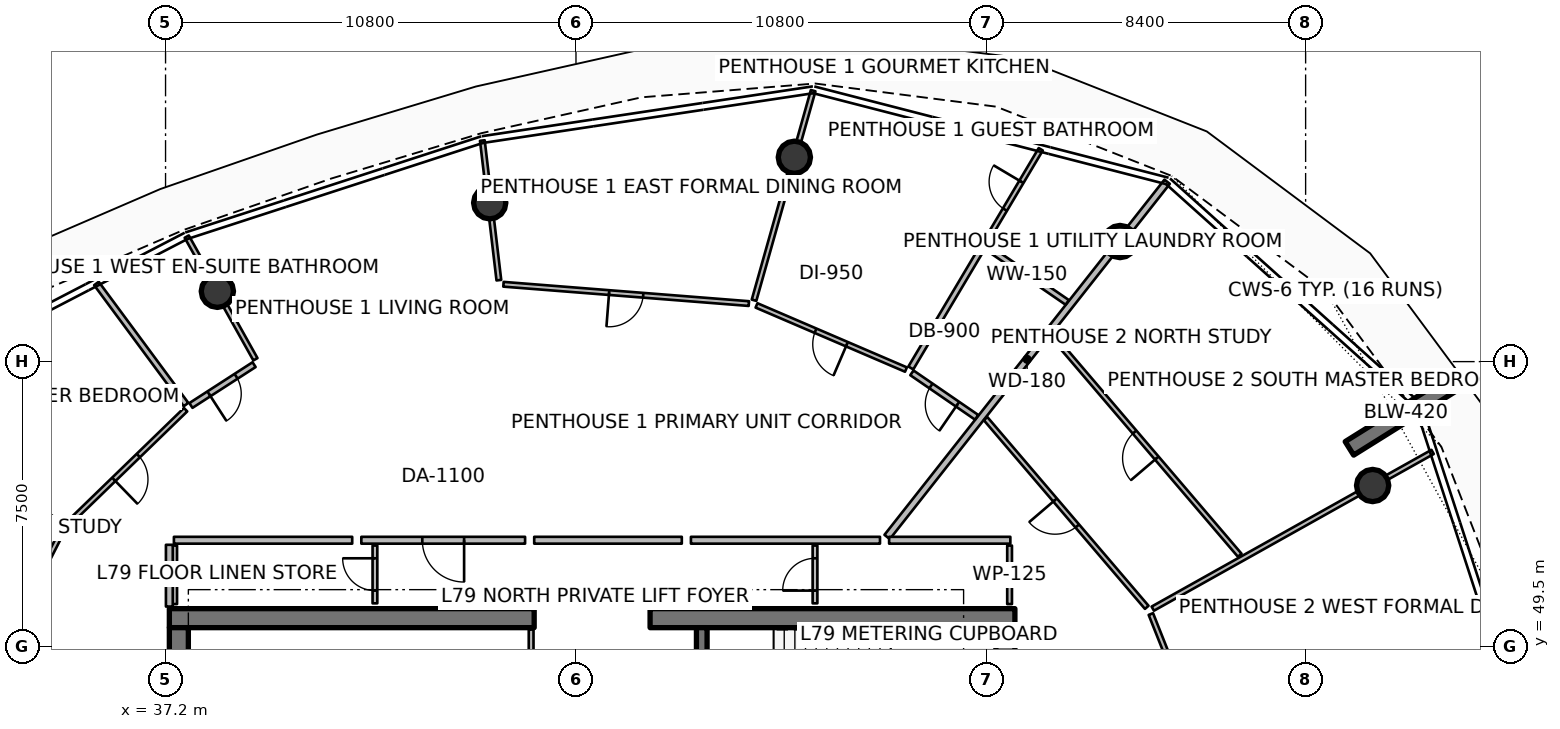
"""IFC4 building model, lengths in metres.
Left out: names, types, materials, properties, quantities, classifications, styles, units other than length and angle.
Written with IfcOpenShell. Run it as: python <this file> out.ifc"""

import sys

from ifc_helpers import new_model, si_unit, direction, frame, frame_2d, origin, origin_2d, place, context, subcontext, project, spatial, rectangle, circle, extrude, element, fill, save


model = new_model("IFC4")
c1 = context("Model", 3, precision=1e-05, world=origin(), true_north=direction((0.0, 1.0)))
c2 = subcontext(c1, "Body", "Model", "MODEL_VIEW")
j1 = project(units=[si_unit("LENGTHUNIT", "METRE"), si_unit("PLANEANGLEUNIT", "RADIAN")], contexts=[c1])
p1 = place(None, origin())
s1 = spatial("IfcSite", under=j1, at=p1, CompositionType="ELEMENT")
p2 = place(p1, origin())
s2 = spatial("IfcBuilding", under=s1, at=p2, CompositionType="ELEMENT")
p3 = place(p2, frame((0.0, 0.0, 313.7)))
s3 = spatial("IfcBuildingStorey", under=s2, at=p3, CompositionType="ELEMENT", Elevation=313.7)
p4 = place(p3, frame((37.3, 50.25, 0.0), z_axis=(0.0, 0.0, 1.0), x_axis=(1.0, 0.0, 0.0)))
e1 = element("IfcWall", 1, at=p4, inside=s3, PredefinedType="SHEAR", context=c2, shape_type="SweptSolid", body=[
    extrude(rectangle(XDim=9.6, YDim=0.5, at=frame_2d((4.8, 0.0))), origin(), (0.0, 0.0, 1.0), 4.2),
])
p5 = place(p3, frame((49.95, 50.25, 0.0), z_axis=(0.0, 0.0, 1.0), x_axis=(1.0, 0.0, 0.0)))
e2 = element("IfcWall", 2, at=p5, inside=s3, PredefinedType="SHEAR", context=c2, shape_type="SweptSolid", body=[
    extrude(rectangle(XDim=9.6, YDim=0.5, at=frame_2d((4.8, 0.0))), origin(), (0.0, 0.0, 1.0), 4.2),
])
for number, where, z_axis, x_axis in (
    (3, (37.55, 34.0, 0.0), (0.0, 0.0, 1.0), (0.0, 1.0, 0.0)),
    (4, (59.3, 34.0, 0.0), (0.0, 0.0, 1.0), (0.0, 1.0, 0.0)),
):
    element("IfcWall", number, at=place(p3, frame(where, z_axis=z_axis, x_axis=x_axis)), inside=s3, PredefinedType="SHEAR", context=c2, shape_type="SweptSolid", body=[
        extrude(rectangle(XDim=16.0, YDim=0.5, at=frame_2d((8.0, 0.0))), origin(), (0.0, 0.0, 1.0), 4.2),
    ])
p6 = place(p3, frame((51.31, 46.5, 0.0), z_axis=(0.0, 0.0, 1.0), x_axis=(0.0, 1.0, 0.0)))
e5 = element("IfcWall", 5, at=p6, inside=s3, PredefinedType="SHEAR", context=c2, shape_type="SweptSolid", body=[
    extrude(rectangle(XDim=3.5, YDim=0.28, at=frame_2d((1.75, 0.0))), origin(), (0.0, 0.0, 1.0), 4.2),
])
p7 = place(p3, frame((68.353, 54.718, 0.0), z_axis=(0.0, 0.0, 1.0), x_axis=(0.848053161125, 0.529911158502, 0.0)))
e6 = element("IfcWall", 6, at=p7, inside=s3, PredefinedType="SOLIDWALL", context=c2, shape_type="SweptSolid", body=[
    extrude(rectangle(XDim=3.5, YDim=0.42, at=frame_2d((1.75, 0.0))), origin(), (0.0, 0.0, 1.0), 4.2),
])
for number, where, z_axis, x_axis in (
    (7, (68.963, 53.74, 0.0), (0.0, 0.0, 1.0), (1.0, 0.0, 0.0)),
    (8, (62.316, 60.159, 0.0), (0.0, 0.0, 1.0), (1.0, 0.0, 0.0)),
    (9, (53.747, 62.376, 0.0), (0.0, 0.0, 1.0), (1.0, 0.0, 0.0)),
    (10, (45.73, 61.179, 0.0), (0.0, 0.0, 1.0), (1.0, 0.0, 0.0)),
    (11, (38.563, 58.851, 0.0), (0.0, 0.0, 1.0), (1.0, 0.0, 0.0)),
):
    element("IfcColumn", number, at=place(p3, frame(where, z_axis=z_axis, x_axis=x_axis)), inside=s3, PredefinedType="COLUMN", context=c2, shape_type="SweptSolid", body=[
        extrude(circle(Radius=0.425, at=origin_2d()), origin(), (0.0, 0.0, 1.0), 3.94),
    ])
p8 = place(p3, frame((46.82, 47.92, 0.0), z_axis=(0.0, 0.0, 1.0), x_axis=(0.0, 1.0, 0.0)))
e12 = element("IfcWall", 12, at=p8, inside=s3, PredefinedType="PARTITIONING", context=c2, shape_type="SweptSolid", body=[
    extrude(rectangle(XDim=2.03, YDim=0.125, at=frame_2d((1.015, 0.0))), origin(), (0.0, 0.0, 1.0), 3.38),
])
for number, where, z_axis, x_axis in (
    (13, (37.44, 50.62, 0.0), (0.0, 0.0, 1.0), (0.0, 1.0, 0.0)),
    (14, (59.41, 50.62, 0.0), (0.0, 0.0, 1.0), (0.0, 1.0, 0.0)),
):
    element("IfcWall", number, at=place(p3, frame(where, z_axis=z_axis, x_axis=x_axis)), inside=s3, PredefinedType="PARTITIONING", context=c2, shape_type="SweptSolid", body=[
        extrude(rectangle(XDim=1.54, YDim=0.125, at=frame_2d((0.77, 0.0))), origin(), (0.0, 0.0, 1.0), 3.38),
    ])
p9 = place(p3, frame((42.71, 50.64, 0.0), z_axis=(0.0, 0.0, 1.0), x_axis=(0.0, 1.0, 0.0)))
e15 = element("IfcWall", 15, at=p9, inside=s3, PredefinedType="PARTITIONING", context=c2, shape_type="SweptSolid", body=[
    extrude(rectangle(XDim=1.52, YDim=0.125, at=frame_2d((0.76, 0.0))), origin(), (0.0, 0.0, 1.0), 3.38),
])
p10 = place(p9, frame((0.335, 0.0, 0.0)))
e16 = element("IfcOpeningElement", 16, at=p10, cuts=e15, PredefinedType="OPENING", context=c2, shape_type="SweptSolid", body=[
    extrude(rectangle(XDim=0.85, YDim=2.06, at=frame_2d((0.425, 1.03))), frame((0.0, 0.073, 0.0), z_axis=(0.0, -1.0, 0.0), x_axis=(1.0, 0.0, 0.0)), (0.0, 0.0, 1.0), 0.145),
])
p11 = place(p3, frame((54.29, 50.64, 0.0), z_axis=(0.0, 0.0, 1.0), x_axis=(0.0, 1.0, 0.0)))
e17 = element("IfcWall", 17, at=p11, inside=s3, PredefinedType="PARTITIONING", context=c2, shape_type="SweptSolid", body=[
    extrude(rectangle(XDim=1.52, YDim=0.125, at=frame_2d((0.76, 0.0))), origin(), (0.0, 0.0, 1.0), 3.38),
])
p12 = place(p11, frame((0.335, 0.0, 0.0)))
e18 = element("IfcOpeningElement", 18, at=p12, cuts=e17, PredefinedType="OPENING", context=c2, shape_type="SweptSolid", body=[
    extrude(rectangle(XDim=0.85, YDim=2.06, at=frame_2d((0.425, 1.03))), frame((0.0, 0.073, 0.0), z_axis=(0.0, -1.0, 0.0), x_axis=(1.0, 0.0, 0.0)), (0.0, 0.0, 1.0), 0.145),
])
p13 = place(p3, frame((56.188, 52.386, 0.0), z_axis=(0.0, 0.0, 1.0), x_axis=(0.619092742501, 0.78531788225, 0.0)))
e19 = element("IfcWall", 19, at=p13, inside=s3, PredefinedType="PARTITIONING", context=c2, shape_type="SweptSolid", body=[
    extrude(rectangle(XDim=11.901, YDim=0.18, at=frame_2d((5.951, 0.0))), origin(), (0.0, 0.0, 1.0), 3.38),
])
p14 = place(p3, frame((46.661, 52.3, 0.0), z_axis=(0.0, 0.0, 1.0), x_axis=(-1.0, 0.0, 0.0)))
e20 = element("IfcWall", 20, at=p14, inside=s3, PredefinedType="PARTITIONING", context=c2, shape_type="SweptSolid", body=[
    extrude(rectangle(XDim=4.309, YDim=0.18, at=frame_2d((2.155, 0.0))), origin(), (0.0, 0.0, 1.0), 3.38),
])
p15 = place(p14, frame((1.604, 0.0, 0.0)))
e21 = element("IfcOpeningElement", 21, at=p15, cuts=e20, PredefinedType="OPENING", context=c2, shape_type="SweptSolid", body=[
    extrude(rectangle(XDim=1.1, YDim=2.1, at=frame_2d((0.55, 1.05))), frame((0.0, 0.1, 0.0), z_axis=(0.0, -1.0, 0.0), x_axis=(1.0, 0.0, 0.0)), (0.0, 0.0, 1.0), 0.2),
])
p16 = place(p3, frame((56.0, 52.3, 0.0), z_axis=(0.0, 0.0, 1.0), x_axis=(-1.0, 0.0, 0.0)))
e22 = element("IfcWall", 22, at=p16, inside=s3, PredefinedType="PARTITIONING", context=c2, shape_type="SweptSolid", body=[
    extrude(rectangle(XDim=4.975, YDim=0.18, at=frame_2d((2.488, 0.0))), origin(), (0.0, 0.0, 1.0), 3.38),
])
p17 = place(p3, frame((58.543, 55.535, 0.0), z_axis=(0.0, 0.0, 1.0), x_axis=(-0.824355515216, 0.566072419865, 0.0)))
e23 = element("IfcWall", 23, at=p17, inside=s3, PredefinedType="PARTITIONING", context=c2, shape_type="SweptSolid", body=[
    extrude(rectangle(XDim=2.066, YDim=0.15, at=frame_2d((1.033, 0.0))), origin(), (0.0, 0.0, 1.0), 3.38),
])
p18 = place(p17, frame((0.608, 0.0, 0.0)))
e24 = element("IfcOpeningElement", 24, at=p18, cuts=e23, PredefinedType="OPENING", context=c2, shape_type="SweptSolid", body=[
    extrude(rectangle(XDim=0.85, YDim=2.06, at=frame_2d((0.425, 1.03))), frame((0.0, 0.085, 0.0), z_axis=(0.0, -1.0, 0.0), x_axis=(1.0, 0.0, 0.0)), (0.0, 0.0, 1.0), 0.17),
])
p19 = place(p3, frame((60.927, 58.559, 0.0), z_axis=(0.0, 0.0, 1.0), x_axis=(-0.824349211277, 0.566081600007, 0.0)))
e25 = element("IfcWall", 25, at=p19, inside=s3, PredefinedType="PARTITIONING", context=c2, shape_type="SweptSolid", body=[
    extrude(rectangle(XDim=2.572, YDim=0.15, at=frame_2d((1.286, 0.0))), origin(), (0.0, 0.0, 1.0), 3.38),
])
p20 = place(p3, frame((56.812, 56.833, 0.0), z_axis=(0.0, 0.0, 1.0), x_axis=(0.510726768545, 0.859743082491, 0.0)))
e26 = element("IfcWall", 26, at=p20, inside=s3, PredefinedType="PARTITIONING", context=c2, shape_type="SweptSolid", body=[
    extrude(rectangle(XDim=3.72, YDim=0.15, at=frame_2d((1.86, 0.0))), origin(), (0.0, 0.0, 1.0), 3.38),
])
p21 = place(p3, frame((58.778, 60.143, 0.0), z_axis=(0.0, 0.0, 1.0), x_axis=(0.510741068581, 0.859734587454, 0.0)))
e27 = element("IfcWall", 27, at=p21, inside=s3, PredefinedType="PARTITIONING", context=c2, shape_type="SweptSolid", body=[
    extrude(rectangle(XDim=2.844, YDim=0.125, at=frame_2d((1.422, 0.0))), origin(), (0.0, 0.0, 1.0), 3.38),
])
p22 = place(p21, frame((0.997, 0.0, 0.0)))
e28 = element("IfcOpeningElement", 28, at=p22, cuts=e27, PredefinedType="OPENING", context=c2, shape_type="SweptSolid", body=[
    extrude(rectangle(XDim=0.85, YDim=2.06, at=frame_2d((0.425, 1.03))), frame((0.0, 0.073, 0.0), z_axis=(0.0, -1.0, 0.0), x_axis=(1.0, 0.0, 0.0)), (0.0, 0.0, 1.0), 0.145),
])
p23 = place(p3, frame((56.683, 56.791, 0.0), z_axis=(0.0, 0.0, 1.0), x_axis=(-0.918926533299, 0.394428734246, 0.0)))
e29 = element("IfcWall", 29, at=p23, inside=s3, PredefinedType="PARTITIONING", context=c2, shape_type="SweptSolid", body=[
    extrude(rectangle(XDim=4.28, YDim=0.125, at=frame_2d((2.14, 0.0))), origin(), (0.0, 0.0, 1.0), 3.38),
])
p24 = place(p23, frame((1.69, 0.0, 0.0)))
e30 = element("IfcOpeningElement", 30, at=p24, cuts=e29, PredefinedType="OPENING", context=c2, shape_type="SweptSolid", body=[
    extrude(rectangle(XDim=0.9, YDim=2.08, at=frame_2d((0.45, 1.04))), frame((0.0, 0.073, 0.0), z_axis=(0.0, -1.0, 0.0), x_axis=(1.0, 0.0, 0.0)), (0.0, 0.0, 1.0), 0.145),
])
p25 = place(p3, frame((50.785, 52.3, 0.0), z_axis=(0.0, 0.0, 1.0), x_axis=(-1.0, 0.0, 0.0)))
e31 = element("IfcWall", 31, at=p25, inside=s3, PredefinedType="PARTITIONING", context=c2, shape_type="SweptSolid", body=[
    extrude(rectangle(XDim=3.884, YDim=0.18, at=frame_2d((1.942, 0.0))), origin(), (0.0, 0.0, 1.0), 3.38),
])
p26 = place(p3, frame((52.686, 58.615, 0.0), z_axis=(0.0, 0.0, 1.0), x_axis=(0.271450045164, 0.962452530248, 0.0)))
e32 = element("IfcWall", 32, at=p26, inside=s3, PredefinedType="PARTITIONING", context=c2, shape_type="SweptSolid", body=[
    extrude(rectangle(XDim=5.73, YDim=0.125, at=frame_2d((2.865, 0.0))), origin(), (0.0, 0.0, 1.0), 3.38),
])
p27 = place(p3, frame((45.971, 59.143, 0.0), z_axis=(0.0, 0.0, 1.0), x_axis=(-0.117541965763, 0.99306791625, 0.0)))
e33 = element("IfcWall", 33, at=p27, inside=s3, PredefinedType="PARTITIONING", context=c2, shape_type="SweptSolid", body=[
    extrude(rectangle(XDim=3.699, YDim=0.125, at=frame_2d((1.85, 0.0))), origin(), (0.0, 0.0, 1.0), 3.38),
])
p28 = place(p3, frame((52.549, 58.527, 0.0), z_axis=(0.0, 0.0, 1.0), x_axis=(-0.996915635348, 0.078480672772, 0.0)))
e34 = element("IfcWall", 34, at=p28, inside=s3, PredefinedType="PARTITIONING", context=c2, shape_type="SweptSolid", body=[
    extrude(rectangle(XDim=6.477, YDim=0.125, at=frame_2d((3.238, 0.0))), origin(), (0.0, 0.0, 1.0), 3.38),
])
p29 = place(p28, frame((2.788, 0.0, 0.0)))
e35 = element("IfcOpeningElement", 35, at=p29, cuts=e34, PredefinedType="OPENING", context=c2, shape_type="SweptSolid", body=[
    extrude(rectangle(XDim=0.9, YDim=2.08, at=frame_2d((0.45, 1.04))), frame((0.0, 0.073, 0.0), z_axis=(0.0, -1.0, 0.0), x_axis=(1.0, 0.0, 0.0)), (0.0, 0.0, 1.0), 0.145),
])
p30 = place(p3, frame((42.112, 52.3, 0.0), z_axis=(0.0, 0.0, 1.0), x_axis=(-1.0, 0.0, 0.0)))
e36 = element("IfcWall", 36, at=p30, inside=s3, PredefinedType="PARTITIONING", context=c2, shape_type="SweptSolid", body=[
    extrude(rectangle(XDim=4.692, YDim=0.18, at=frame_2d((2.346, 0.0))), origin(), (0.0, 0.0, 1.0), 3.38),
])
p31 = place(p3, frame((37.3, 52.18, 0.0), z_axis=(0.0, 0.0, 1.0), x_axis=(0.0, -1.0, 0.0)))
e37 = element("IfcWall", 37, at=p31, inside=s3, PredefinedType="PARTITIONING", context=c2, shape_type="SweptSolid", body=[
    extrude(rectangle(XDim=1.625, YDim=0.18, at=frame_2d((0.812, 0.0))), origin(), (0.0, 0.0, 1.0), 3.38),
])
p32 = place(p3, frame((39.565, 57.062, 0.0), z_axis=(0.0, 0.0, 1.0), x_axis=(-0.488615426152, 0.872499263797, 0.0)))
e38 = element("IfcWall", 38, at=p32, inside=s3, PredefinedType="PARTITIONING", context=c2, shape_type="SweptSolid", body=[
    extrude(rectangle(XDim=3.699, YDim=0.125, at=frame_2d((1.85, 0.0))), origin(), (0.0, 0.0, 1.0), 3.38),
])
p33 = place(p3, frame((39.53, 56.92, 0.0), z_axis=(0.0, 0.0, 1.0), x_axis=(-0.839824942878, -0.542857315802, 0.0)))
e39 = element("IfcWall", 39, at=p33, inside=s3, PredefinedType="PARTITIONING", context=c2, shape_type="SweptSolid", body=[
    extrude(rectangle(XDim=1.979, YDim=0.15, at=frame_2d((0.989, 0.0))), origin(), (0.0, 0.0, 1.0), 3.38),
])
p34 = place(p33, frame((0.564, 0.0, 0.0)))
e40 = element("IfcOpeningElement", 40, at=p34, cuts=e39, PredefinedType="OPENING", context=c2, shape_type="SweptSolid", body=[
    extrude(rectangle(XDim=0.85, YDim=2.06, at=frame_2d((0.425, 1.03))), frame((0.0, 0.085, 0.0), z_axis=(0.0, -1.0, 0.0), x_axis=(1.0, 0.0, 0.0)), (0.0, 0.0, 1.0), 0.17),
])
p35 = place(p3, frame((37.739, 55.87, 0.0), z_axis=(0.0, 0.0, 1.0), x_axis=(-0.594773749171, 0.803893144203, 0.0)))
e41 = element("IfcWall", 41, at=p35, inside=s3, PredefinedType="PARTITIONING", context=c2, shape_type="SweptSolid", body=[
    extrude(rectangle(XDim=3.964, YDim=0.15, at=frame_2d((1.982, 0.0))), origin(), (0.0, 0.0, 1.0), 3.38),
])
p36 = place(p3, frame((37.728, 55.735, 0.0), z_axis=(0.0, 0.0, 1.0), x_axis=(-0.717843655189, -0.696204342636, 0.0)))
e42 = element("IfcWall", 42, at=p36, inside=s3, PredefinedType="PARTITIONING", context=c2, shape_type="SweptSolid", body=[
    extrude(rectangle(XDim=4.366, YDim=0.125, at=frame_2d((2.183, 0.0))), origin(), (0.0, 0.0, 1.0), 3.38),
])
p37 = place(p36, frame((1.733, 0.0, 0.0)))
e43 = element("IfcOpeningElement", 43, at=p37, cuts=e42, PredefinedType="OPENING", context=c2, shape_type="SweptSolid", body=[
    extrude(rectangle(XDim=0.9, YDim=2.08, at=frame_2d((0.45, 1.04))), frame((0.0, 0.073, 0.0), z_axis=(0.0, -1.0, 0.0), x_axis=(1.0, 0.0, 0.0)), (0.0, 0.0, 1.0), 0.145),
])
p38 = place(p3, frame((34.443, 52.688, 0.0), z_axis=(0.0, 0.0, 1.0), x_axis=(-0.785329715116, 0.61907773224, 0.0)))
e44 = element("IfcWall", 44, at=p38, inside=s3, PredefinedType="PARTITIONING", context=c2, shape_type="SweptSolid", body=[
    extrude(rectangle(XDim=5.73, YDim=0.125, at=frame_2d((2.865, 0.0))), origin(), (0.0, 0.0, 1.0), 3.38),
])
p39 = place(p3, frame((34.472, 52.528, 0.0), z_axis=(0.0, 0.0, 1.0), x_axis=(-0.453985634683, -0.891009003042, 0.0)))
e45 = element("IfcWall", 45, at=p39, inside=s3, PredefinedType="PARTITIONING", context=c2, shape_type="SweptSolid", body=[
    extrude(rectangle(XDim=6.477, YDim=0.125, at=frame_2d((3.238, 0.0))), origin(), (0.0, 0.0, 1.0), 3.38),
])
p40 = place(p39, frame((2.788, 0.0, 0.0)))
e46 = element("IfcOpeningElement", 46, at=p40, cuts=e45, PredefinedType="OPENING", context=c2, shape_type="SweptSolid", body=[
    extrude(rectangle(XDim=0.9, YDim=2.08, at=frame_2d((0.45, 1.04))), frame((0.0, 0.073, 0.0), z_axis=(0.0, -1.0, 0.0), x_axis=(1.0, 0.0, 0.0)), (0.0, 0.0, 1.0), 0.145),
])
p41 = place(p3, frame((64.743, 46.297, 0.0), z_axis=(0.0, 0.0, 1.0), x_axis=(-0.369569971378, 0.929202903706, 0.0)))
e47 = element("IfcWall", 47, at=p41, inside=s3, PredefinedType="PARTITIONING", context=c2, shape_type="SweptSolid", body=[
    extrude(rectangle(XDim=4.371, YDim=0.125, at=frame_2d((2.186, 0.0))), origin(), (0.0, 0.0, 1.0), 3.38),
])
p42 = place(p41, frame((1.736, 0.0, 0.0)))
e48 = element("IfcOpeningElement", 48, at=p42, cuts=e47, PredefinedType="OPENING", context=c2, shape_type="SweptSolid", body=[
    extrude(rectangle(XDim=0.9, YDim=2.08, at=frame_2d((0.45, 1.04))), frame((0.0, 0.073, 0.0), z_axis=(0.0, -1.0, 0.0), x_axis=(1.0, 0.0, 0.0)), (0.0, 0.0, 1.0), 0.145),
])
p43 = place(p3, frame((59.43, 52.3, 0.0), z_axis=(0.0, 0.0, 1.0), x_axis=(-1.0, 0.0, 0.0)))
e49 = element("IfcWall", 49, at=p43, inside=s3, PredefinedType="PARTITIONING", context=c2, shape_type="SweptSolid", body=[
    extrude(rectangle(XDim=3.19, YDim=0.18, at=frame_2d((1.595, 0.0))), origin(), (0.0, 0.0, 1.0), 3.38),
])
p44 = place(p3, frame((63.178, 50.5, 0.0), z_axis=(0.0, 0.0, 1.0), x_axis=(0.872495656661, 0.488621867201, 0.0)))
e50 = element("IfcWall", 50, at=p44, inside=s3, PredefinedType="PARTITIONING", context=c2, shape_type="SweptSolid", body=[
    extrude(rectangle(XDim=8.44, YDim=0.125, at=frame_2d((4.22, 0.0))), origin(), (0.0, 0.0, 1.0), 3.38),
])
p45 = place(p3, frame((63.019, 50.535, 0.0), z_axis=(0.0, 0.0, 1.0), x_axis=(-0.649450715324, 0.760403687764, 0.0)))
e51 = element("IfcWall", 51, at=p45, inside=s3, PredefinedType="PARTITIONING", context=c2, shape_type="SweptSolid", body=[
    extrude(rectangle(XDim=6.529, YDim=0.125, at=frame_2d((3.264, 0.0))), origin(), (0.0, 0.0, 1.0), 3.38),
])
p46 = place(p45, frame((2.814, 0.0, 0.0)))
e52 = element("IfcOpeningElement", 52, at=p46, cuts=e51, PredefinedType="OPENING", context=c2, shape_type="SweptSolid", body=[
    extrude(rectangle(XDim=0.9, YDim=2.08, at=frame_2d((0.45, 1.04))), frame((0.0, 0.073, 0.0), z_axis=(0.0, -1.0, 0.0), x_axis=(1.0, 0.0, 0.0)), (0.0, 0.0, 1.0), 0.145),
])
p47 = place(p3, frame((65.467, 51.906, 0.0), z_axis=(0.0, 0.0, 1.0), x_axis=(-0.649439942486, 0.760412888571, 0.0)))
e53 = element("IfcWall", 53, at=p47, inside=s3, PredefinedType="PARTITIONING", context=c2, shape_type="SweptSolid", body=[
    extrude(rectangle(XDim=7.623, YDim=0.125, at=frame_2d((3.812, 0.0))), origin(), (0.0, 0.0, 1.0), 3.38),
])
p48 = place(p47, frame((3.362, 0.0, 0.0)))
e54 = element("IfcOpeningElement", 54, at=p48, cuts=e53, PredefinedType="OPENING", context=c2, shape_type="SweptSolid", body=[
    extrude(rectangle(XDim=0.9, YDim=2.08, at=frame_2d((0.45, 1.04))), frame((0.0, 0.073, 0.0), z_axis=(0.0, -1.0, 0.0), x_axis=(1.0, 0.0, 0.0)), (0.0, 0.0, 1.0), 0.145),
])
p49 = place(p10, origin())
e55 = element("IfcDoor", 55, at=p49, inside=s3, OperationType="SINGLE_SWING_RIGHT", PredefinedType="DOOR", context=c2, shape_type="SweptSolid", body=[
    extrude(rectangle(XDim=0.85, YDim=2.06, at=frame_2d((0.425, 1.03))), frame((0.0, 0.025, 0.0), z_axis=(0.0, -1.0, 0.0), x_axis=(1.0, 0.0, 0.0)), (0.0, 0.0, 1.0), 0.05),
])
fill(e16, e55)
p50 = place(p12, origin())
e56 = element("IfcDoor", 56, at=p50, inside=s3, OperationType="SINGLE_SWING_LEFT", PredefinedType="DOOR", context=c2, shape_type="SweptSolid", body=[
    extrude(rectangle(XDim=0.85, YDim=2.06, at=frame_2d((0.425, 1.03))), frame((0.0, 0.025, 0.0), z_axis=(0.0, -1.0, 0.0), x_axis=(1.0, 0.0, 0.0)), (0.0, 0.0, 1.0), 0.05),
])
fill(e18, e56)
p51 = place(p15, origin())
e57 = element("IfcDoor", 57, at=p51, inside=s3, OperationType="SINGLE_SWING_LEFT", PredefinedType="DOOR", context=c2, shape_type="SweptSolid", body=[
    extrude(rectangle(XDim=1.1, YDim=2.1, at=frame_2d((0.55, 1.05))), frame((0.0, 0.025, 0.0), z_axis=(0.0, -1.0, 0.0), x_axis=(1.0, 0.0, 0.0)), (0.0, 0.0, 1.0), 0.05),
])
fill(e21, e57)
p52 = place(p18, origin())
e58 = element("IfcDoor", 58, at=p52, inside=s3, OperationType="SINGLE_SWING_LEFT", PredefinedType="DOOR", context=c2, shape_type="SweptSolid", body=[
    extrude(rectangle(XDim=0.85, YDim=2.06, at=frame_2d((0.425, 1.03))), frame((0.0, 0.025, 0.0), z_axis=(0.0, -1.0, 0.0), x_axis=(1.0, 0.0, 0.0)), (0.0, 0.0, 1.0), 0.05),
])
fill(e24, e58)
p53 = place(p22, origin())
e59 = element("IfcDoor", 59, at=p53, inside=s3, OperationType="SINGLE_SWING_RIGHT", PredefinedType="DOOR", context=c2, shape_type="SweptSolid", body=[
    extrude(rectangle(XDim=0.85, YDim=2.06, at=frame_2d((0.425, 1.03))), frame((0.0, 0.025, 0.0), z_axis=(0.0, -1.0, 0.0), x_axis=(1.0, 0.0, 0.0)), (0.0, 0.0, 1.0), 0.05),
])
fill(e28, e59)
p54 = place(p24, origin())
e60 = element("IfcDoor", 60, at=p54, inside=s3, OperationType="SINGLE_SWING_LEFT", PredefinedType="DOOR", context=c2, shape_type="SweptSolid", body=[
    extrude(rectangle(XDim=0.9, YDim=2.08, at=frame_2d((0.45, 1.04))), frame((0.0, 0.025, 0.0), z_axis=(0.0, -1.0, 0.0), x_axis=(1.0, 0.0, 0.0)), (0.0, 0.0, 1.0), 0.05),
])
fill(e30, e60)
p55 = place(p29, origin())
e61 = element("IfcDoor", 61, at=p55, inside=s3, OperationType="SINGLE_SWING_RIGHT", PredefinedType="DOOR", context=c2, shape_type="SweptSolid", body=[
    extrude(rectangle(XDim=0.9, YDim=2.08, at=frame_2d((0.45, 1.04))), frame((0.0, 0.025, 0.0), z_axis=(0.0, -1.0, 0.0), x_axis=(1.0, 0.0, 0.0)), (0.0, 0.0, 1.0), 0.05),
])
fill(e35, e61)
p56 = place(p34, origin())
e62 = element("IfcDoor", 62, at=p56, inside=s3, OperationType="SINGLE_SWING_RIGHT", PredefinedType="DOOR", context=c2, shape_type="SweptSolid", body=[
    extrude(rectangle(XDim=0.85, YDim=2.06, at=frame_2d((0.425, 1.03))), frame((0.0, 0.025, 0.0), z_axis=(0.0, -1.0, 0.0), x_axis=(1.0, 0.0, 0.0)), (0.0, 0.0, 1.0), 0.05),
])
fill(e40, e62)
p57 = place(p37, origin())
e63 = element("IfcDoor", 63, at=p57, inside=s3, OperationType="SINGLE_SWING_RIGHT", PredefinedType="DOOR", context=c2, shape_type="SweptSolid", body=[
    extrude(rectangle(XDim=0.9, YDim=2.08, at=frame_2d((0.45, 1.04))), frame((0.0, 0.025, 0.0), z_axis=(0.0, -1.0, 0.0), x_axis=(1.0, 0.0, 0.0)), (0.0, 0.0, 1.0), 0.05),
])
fill(e43, e63)
p58 = place(p46, origin())
e64 = element("IfcDoor", 64, at=p58, inside=s3, OperationType="SINGLE_SWING_RIGHT", PredefinedType="DOOR", context=c2, shape_type="SweptSolid", body=[
    extrude(rectangle(XDim=0.9, YDim=2.08, at=frame_2d((0.45, 1.04))), frame((0.0, 0.025, 0.0), z_axis=(0.0, -1.0, 0.0), x_axis=(1.0, 0.0, 0.0)), (0.0, 0.0, 1.0), 0.05),
])
fill(e52, e64)
p59 = place(p48, origin())
e65 = element("IfcDoor", 65, at=p59, inside=s3, OperationType="SINGLE_SWING_LEFT", PredefinedType="DOOR", context=c2, shape_type="SweptSolid", body=[
    extrude(rectangle(XDim=0.9, YDim=2.08, at=frame_2d((0.45, 1.04))), frame((0.0, 0.025, 0.0), z_axis=(0.0, -1.0, 0.0), x_axis=(1.0, 0.0, 0.0)), (0.0, 0.0, 1.0), 0.05),
])
fill(e54, e65)
save(model, sys.argv[1])
